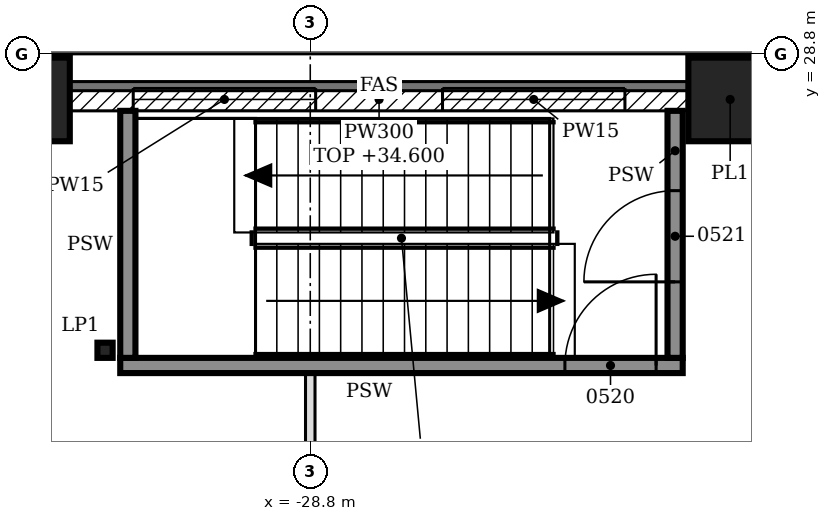
"""IFC4 building model, lengths in metres.
Left out: names, types, materials, properties, quantities, classifications, styles, units other than length and angle.
Written with IfcOpenShell. Run it as: python <this file> out.ifc"""

import sys

from ifc_helpers import new_model, si_unit, direction, frame, frame_2d, origin, origin_2d, place, context, subcontext, project, spatial, polyline, rectangle, hollow_rectangle, i_section, outline, extrude, element, fill, save


model = new_model("IFC4")
c1 = context("Model", 3, precision=1e-05, world=origin(), true_north=direction((0.0, 1.0)))
c2 = subcontext(c1, "Body", "Model", "MODEL_VIEW")
j1 = project(units=[si_unit("LENGTHUNIT", "METRE"), si_unit("PLANEANGLEUNIT", "RADIAN")], contexts=[c1])
p1 = place(None, origin())
s1 = spatial("IfcSite", under=j1, at=p1, CompositionType="ELEMENT")
p2 = place(p1, origin())
s2 = spatial("IfcBuilding", under=s1, at=p2, CompositionType="ELEMENT")
p3 = place(p2, frame((0.0, 0.0, 30.6)))
s3 = spatial("IfcBuildingStorey", under=s2, at=p3, CompositionType="ELEMENT", Elevation=30.6)
for number, where, z_axis, x_axis in (
    (1, (-23.276, 28.2, 0.0), (0.0, 0.0, 1.0), (1.0, 0.0, 0.0)),
    (2, (-32.514, 28.2, 0.0), (0.0, 0.0, 1.0), (1.0, 0.0, 0.0)),
):
    element("IfcColumn", number, at=place(p3, frame(where, z_axis=z_axis, x_axis=x_axis)), inside=s3, PredefinedType="COLUMN", context=c2, shape_type="SweptSolid", body=[
        extrude(hollow_rectangle(XDim=1.1, YDim=1.1, WallThickness=0.06, at=origin_2d()), origin(), (0.0, 0.0, 1.0), 4.8),
    ])
p4 = place(p3, frame((-31.5, 24.9, 0.0), z_axis=(0.0, 0.0, 1.0), x_axis=(1.0, 0.0, 0.0)))
e3 = element("IfcColumn", 3, at=p4, inside=s3, PredefinedType="COLUMN", context=c2, shape_type="SweptSolid", body=[
    extrude(i_section(OverallWidth=0.2, OverallDepth=0.2, WebThickness=0.009, FlangeThickness=0.015, FilletRadius=0.018, at=origin_2d()), origin(), (0.0, 0.0, 1.0), 2.2),
])
p5 = place(p3, frame((-23.826, 28.2, 0.0), z_axis=(0.0, 0.0, 1.0), x_axis=(-1.0, 0.0, 0.0)))
e4 = element("IfcWall", 4, at=p5, inside=s3, PredefinedType="SOLIDWALL", context=c2, shape_type="SweptSolid", body=[
    extrude(rectangle(XDim=8.138, YDim=0.3, at=frame_2d((4.069, 0.0))), origin(), (0.0, 0.0, 1.0), 4.0),
])
p6 = place(p5, frame((0.834, 0.0, 0.9)))
e5 = element("IfcOpeningElement", 5, at=p6, cuts=e4, PredefinedType="OPENING", context=c2, shape_type="SweptSolid", body=[
    extrude(rectangle(XDim=2.4, YDim=1.5, at=frame_2d((1.2, 0.75))), frame((0.0, 0.16, 0.0), z_axis=(0.0, -1.0, 0.0), x_axis=(1.0, 0.0, 0.0)), (0.0, 0.0, 1.0), 0.32),
])
p7 = place(p5, frame((4.903, 0.0, 0.9)))
e6 = element("IfcOpeningElement", 6, at=p7, cuts=e4, PredefinedType="OPENING", context=c2, shape_type="SweptSolid", body=[
    extrude(rectangle(XDim=2.4, YDim=1.5, at=frame_2d((1.2, 0.75))), frame((0.0, 0.16, 0.0), z_axis=(0.0, -1.0, 0.0), x_axis=(1.0, 0.0, 0.0)), (0.0, 0.0, 1.0), 0.32),
])
p8 = place(p3, frame((-28.8, -24.6, 0.0), z_axis=(0.0, 0.0, 1.0), x_axis=(0.0, 1.0, 0.0)))
e7 = element("IfcWall", 7, at=p8, inside=s3, PredefinedType="PARTITIONING", context=c2, shape_type="SweptSolid", body=[
    extrude(outline(polyline([(0.0, 0.0), (49.2, 0.0), (49.2, 4.6), (43.95, 4.6), (43.948, 3.98), (43.65, 3.98), (43.648, 4.6), (39.15, 4.6), (39.148, 3.98), (38.85, 3.98), (38.848, 4.6), (34.35, 4.6), (34.348, 3.98), (34.05, 3.98), (34.048, 4.6), (29.55, 4.6), (29.548, 3.98), (29.25, 3.98), (29.248, 4.6), (24.75, 4.6), (24.748, 3.98), (24.45, 3.98), (24.448, 4.6), (19.95, 4.6), (19.948, 3.98), (19.65, 3.98), (19.648, 4.6), (15.15, 4.6), (15.148, 3.98), (14.85, 3.98), (14.848, 4.6), (10.35, 4.6), (10.348, 3.98), (10.05, 3.98), (10.048, 4.6), (5.55, 4.6), (5.548, 3.98), (5.25, 3.98), (5.248, 4.6), (0.0, 4.6), (0.0, 0.0)])), frame((0.0, 0.062, 0.0), z_axis=(0.0, -1.0, 0.0), x_axis=(1.0, 0.0, 0.0)), (0.0, 0.0, 1.0), 0.125),
])
p9 = place(p8, frame((1.7, 0.0, 0.0)))
e8 = element("IfcOpeningElement", 8, at=p9, cuts=e7, PredefinedType="OPENING", context=c2, shape_type="SweptSolid", body=[
    extrude(rectangle(XDim=1.8, YDim=2.1, at=frame_2d((0.9, 1.05))), frame((0.0, 0.073, 0.0), z_axis=(0.0, -1.0, 0.0), x_axis=(1.0, 0.0, 0.0)), (0.0, 0.0, 1.0), 0.145),
])
p10 = place(p8, frame((8.05, 0.0, 0.0)))
e9 = element("IfcOpeningElement", 9, at=p10, cuts=e7, PredefinedType="OPENING", context=c2, shape_type="SweptSolid", body=[
    extrude(rectangle(XDim=1.8, YDim=2.1, at=frame_2d((0.9, 1.05))), frame((0.0, 0.073, 0.0), z_axis=(0.0, -1.0, 0.0), x_axis=(1.0, 0.0, 0.0)), (0.0, 0.0, 1.0), 0.145),
])
p11 = place(p8, frame((14.7, 0.0, 0.0)))
e10 = element("IfcOpeningElement", 10, at=p11, cuts=e7, PredefinedType="OPENING", context=c2, shape_type="SweptSolid", body=[
    extrude(rectangle(XDim=1.8, YDim=2.1, at=frame_2d((0.9, 1.05))), frame((0.0, 0.073, 0.0), z_axis=(0.0, -1.0, 0.0), x_axis=(1.0, 0.0, 0.0)), (0.0, 0.0, 1.0), 0.145),
])
p12 = place(p8, frame((21.2, 0.0, 0.0)))
e11 = element("IfcOpeningElement", 11, at=p12, cuts=e7, PredefinedType="OPENING", context=c2, shape_type="SweptSolid", body=[
    extrude(rectangle(XDim=1.8, YDim=2.1, at=frame_2d((0.9, 1.05))), frame((0.0, 0.073, 0.0), z_axis=(0.0, -1.0, 0.0), x_axis=(1.0, 0.0, 0.0)), (0.0, 0.0, 1.0), 0.145),
])
p13 = place(p8, frame((26.2, 0.0, 0.0)))
e12 = element("IfcOpeningElement", 12, at=p13, cuts=e7, PredefinedType="OPENING", context=c2, shape_type="SweptSolid", body=[
    extrude(rectangle(XDim=1.8, YDim=2.1, at=frame_2d((0.9, 1.05))), frame((0.0, 0.073, 0.0), z_axis=(0.0, -1.0, 0.0), x_axis=(1.0, 0.0, 0.0)), (0.0, 0.0, 1.0), 0.145),
])
p14 = place(p8, frame((32.7, 0.0, 0.0)))
e13 = element("IfcOpeningElement", 13, at=p14, cuts=e7, PredefinedType="OPENING", context=c2, shape_type="SweptSolid", body=[
    extrude(rectangle(XDim=1.8, YDim=2.1, at=frame_2d((0.9, 1.05))), frame((0.0, 0.073, 0.0), z_axis=(0.0, -1.0, 0.0), x_axis=(1.0, 0.0, 0.0)), (0.0, 0.0, 1.0), 0.145),
])
p15 = place(p8, frame((39.35, 0.0, 0.0)))
e14 = element("IfcOpeningElement", 14, at=p15, cuts=e7, PredefinedType="OPENING", context=c2, shape_type="SweptSolid", body=[
    extrude(rectangle(XDim=1.8, YDim=2.1, at=frame_2d((0.9, 1.05))), frame((0.0, 0.073, 0.0), z_axis=(0.0, -1.0, 0.0), x_axis=(1.0, 0.0, 0.0)), (0.0, 0.0, 1.0), 0.145),
])
p16 = place(p8, frame((45.7, 0.0, 0.0)))
e15 = element("IfcOpeningElement", 15, at=p16, cuts=e7, PredefinedType="OPENING", context=c2, shape_type="SweptSolid", body=[
    extrude(rectangle(XDim=1.8, YDim=2.1, at=frame_2d((0.9, 1.05))), frame((0.0, 0.073, 0.0), z_axis=(0.0, -1.0, 0.0), x_axis=(1.0, 0.0, 0.0)), (0.0, 0.0, 1.0), 0.145),
])
p17 = place(p3, frame((-31.3, 24.7, 0.0), z_axis=(0.0, 0.0, 1.0), x_axis=(1.0, 0.0, 0.0)))
e16 = element("IfcWall", 16, at=p17, inside=s3, PredefinedType="SOLIDWALL", context=c2, shape_type="SweptSolid", body=[
    extrude(rectangle(XDim=7.4, YDim=0.2, at=frame_2d((3.7, 0.0))), origin(), (0.0, 0.0, 1.0), 4.6),
])
p18 = place(p17, frame((5.85, 0.0, 0.0)))
e17 = element("IfcOpeningElement", 17, at=p18, cuts=e16, PredefinedType="OPENING", context=c2, shape_type="SweptSolid", body=[
    extrude(rectangle(XDim=1.2, YDim=2.1, at=frame_2d((0.6, 1.05))), frame((0.0, 0.11, 0.0), z_axis=(0.0, -1.0, 0.0), x_axis=(1.0, 0.0, 0.0)), (0.0, 0.0, 1.0), 0.22),
])
p19 = place(p3, frame((-31.2, 24.8, 0.0), z_axis=(0.0, 0.0, 1.0), x_axis=(0.0, 1.0, 0.0)))
e18 = element("IfcWall", 18, at=p19, inside=s3, PredefinedType="SOLIDWALL", context=c2, shape_type="SweptSolid", body=[
    extrude(rectangle(XDim=3.25, YDim=0.2, at=frame_2d((1.625, 0.0))), origin(), (0.0, 0.0, 1.0), 4.6),
])
p20 = place(p3, frame((-24.0, 24.8, 0.0), z_axis=(0.0, 0.0, 1.0), x_axis=(0.0, 1.0, 0.0)))
e19 = element("IfcWall", 19, at=p20, inside=s3, PredefinedType="SOLIDWALL", context=c2, shape_type="SweptSolid", body=[
    extrude(rectangle(XDim=3.25, YDim=0.2, at=frame_2d((1.625, 0.0))), origin(), (0.0, 0.0, 1.0), 4.6),
])
p21 = place(p20, frame((1.0, 0.0, 0.0)))
e20 = element("IfcOpeningElement", 20, at=p21, cuts=e19, PredefinedType="OPENING", context=c2, shape_type="SweptSolid", body=[
    extrude(rectangle(XDim=1.2, YDim=2.1, at=frame_2d((0.6, 1.05))), frame((0.0, 0.11, 0.0), z_axis=(0.0, -1.0, 0.0), x_axis=(1.0, 0.0, 0.0)), (0.0, 0.0, 1.0), 0.22),
])
p22 = place(p6, origin())
e21 = element("IfcWindow", 21, at=p22, inside=s3, PartitioningType="SINGLE_PANEL", PredefinedType="WINDOW", context=c2, shape_type="SweptSolid", body=[
    extrude(rectangle(XDim=2.4, YDim=1.5, at=frame_2d((1.2, 0.75))), frame((0.0, 0.03, 0.0), z_axis=(0.0, -1.0, 0.0), x_axis=(1.0, 0.0, 0.0)), (0.0, 0.0, 1.0), 0.06),
])
fill(e5, e21)
p23 = place(p7, origin())
e22 = element("IfcWindow", 22, at=p23, inside=s3, PartitioningType="SINGLE_PANEL", PredefinedType="WINDOW", context=c2, shape_type="SweptSolid", body=[
    extrude(rectangle(XDim=2.4, YDim=1.5, at=frame_2d((1.2, 0.75))), frame((0.0, 0.03, 0.0), z_axis=(0.0, -1.0, 0.0), x_axis=(1.0, 0.0, 0.0)), (0.0, 0.0, 1.0), 0.06),
])
fill(e6, e22)
p24 = place(p18, origin())
e23 = element("IfcDoor", 23, at=p24, inside=s3, OperationType="SINGLE_SWING_RIGHT", PredefinedType="DOOR", context=c2, shape_type="SweptSolid", body=[
    extrude(rectangle(XDim=1.2, YDim=2.1, at=frame_2d((0.6, 1.05))), frame((0.0, 0.025, 0.0), z_axis=(0.0, -1.0, 0.0), x_axis=(1.0, 0.0, 0.0)), (0.0, 0.0, 1.0), 0.05),
])
fill(e17, e23)
p25 = place(p21, origin())
e24 = element("IfcDoor", 24, at=p25, inside=s3, OperationType="SINGLE_SWING_LEFT", PredefinedType="DOOR", context=c2, shape_type="SweptSolid", body=[
    extrude(rectangle(XDim=1.2, YDim=2.1, at=frame_2d((0.6, 1.05))), frame((0.0, 0.025, 0.0), z_axis=(0.0, -1.0, 0.0), x_axis=(1.0, 0.0, 0.0)), (0.0, 0.0, 1.0), 0.05),
])
fill(e20, e24)
save(model, sys.argv[1])
